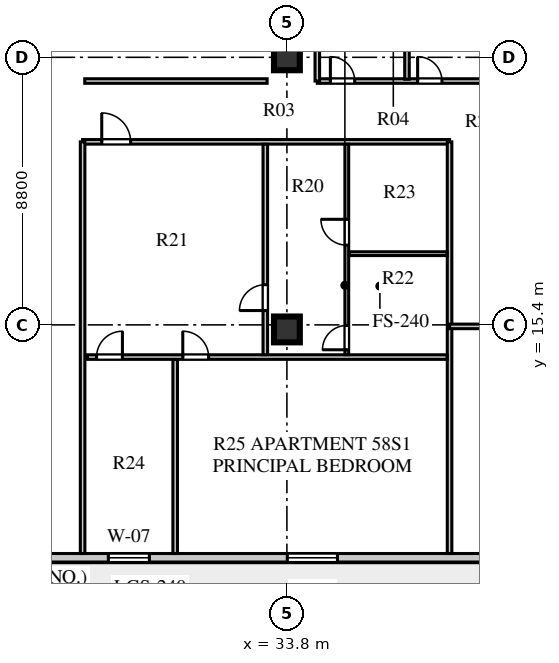
"""IFC4 building model, lengths in metres.
Left out: names, types, materials, properties, quantities, classifications, styles, units other than length and angle.
Written with IfcOpenShell. Run it as: python <this file> out.ifc"""

import sys

from ifc_helpers import new_model, si_unit, direction, frame, frame_2d, origin, origin_2d, place, context, subcontext, project, spatial, rectangle, extrude, element, fill, save


model = new_model("IFC4")
c1 = context("Model", 3, precision=1e-05, world=origin(), true_north=direction((0.0, 1.0)))
c2 = subcontext(c1, "Body", "Model", "MODEL_VIEW")
j1 = project(units=[si_unit("LENGTHUNIT", "METRE"), si_unit("PLANEANGLEUNIT", "RADIAN")], contexts=[c1])
p1 = place(None, origin())
s1 = spatial("IfcSite", under=j1, at=p1, CompositionType="ELEMENT")
p2 = place(p1, origin())
s2 = spatial("IfcBuilding", under=s1, at=p2, CompositionType="ELEMENT")
p3 = place(p2, frame((0.0, 0.0, 237.5)))
s3 = spatial("IfcBuildingStorey", under=s2, at=p3, CompositionType="ELEMENT", Elevation=237.5)
for number, where, z_axis, x_axis in (
    (1, (33.8, 15.25, 0.0), (0.0, 0.0, 1.0), (1.0, 0.0, 0.0)),
    (2, (33.8, 24.2, 0.0), (0.0, 0.0, 1.0), (1.0, 0.0, 0.0)),
):
    element("IfcColumn", number, at=place(p3, frame(where, z_axis=z_axis, x_axis=x_axis)), inside=s3, PredefinedType="COLUMN", context=c2, shape_type="SweptSolid", body=[
        extrude(rectangle(XDim=0.85, YDim=0.85, at=origin_2d()), origin(), (0.0, 0.0, 1.0), 3.66),
    ])
p4 = place(p3, frame((13.05, 7.74, 0.0), z_axis=(0.0, 0.0, 1.0), x_axis=(1.0, 0.0, 0.0)))
e3 = element("IfcWall", 3, at=p4, inside=s3, PredefinedType="STANDARD", context=c2, shape_type="SweptSolid", body=[
    extrude(rectangle(XDim=32.5, YDim=0.28, at=frame_2d((16.25, 0.0))), origin(), (0.0, 0.0, 1.0), 3.66),
])
p5 = place(p4, frame((0.95, 0.0, 0.0)))
e4 = element("IfcOpeningElement", 4, at=p5, cuts=e3, PredefinedType="OPENING", context=c2, shape_type="SweptSolid", body=[
    extrude(rectangle(XDim=1.0, YDim=2.05, at=frame_2d((0.5, 1.025))), frame((0.0, 0.15, 0.0), z_axis=(0.0, -1.0, 0.0), x_axis=(1.0, 0.0, 0.0)), (0.0, 0.0, 1.0), 0.3),
])
p6 = place(p4, frame((5.985, 0.0, 0.8)))
e5 = element("IfcOpeningElement", 5, at=p6, cuts=e3, PredefinedType="OPENING", context=c2, shape_type="SweptSolid", body=[
    extrude(rectangle(XDim=2.1, YDim=1.95, at=frame_2d((1.05, 0.975))), frame((0.0, 0.15, 0.0), z_axis=(0.0, -1.0, 0.0), x_axis=(1.0, 0.0, 0.0)), (0.0, 0.0, 1.0), 0.3),
])
p7 = place(p4, frame((14.877, 0.0, 0.8)))
e6 = element("IfcOpeningElement", 6, at=p7, cuts=e3, PredefinedType="OPENING", context=c2, shape_type="SweptSolid", body=[
    extrude(rectangle(XDim=1.35, YDim=1.9, at=frame_2d((0.675, 0.95))), frame((0.0, 0.15, 0.0), z_axis=(0.0, -1.0, 0.0), x_axis=(1.0, 0.0, 0.0)), (0.0, 0.0, 1.0), 0.3),
])
p8 = place(p4, frame((20.763, 0.0, 0.8)))
e7 = element("IfcOpeningElement", 7, at=p8, cuts=e3, PredefinedType="OPENING", context=c2, shape_type="SweptSolid", body=[
    extrude(rectangle(XDim=1.65, YDim=1.95, at=frame_2d((0.825, 0.975))), frame((0.0, 0.15, 0.0), z_axis=(0.0, -1.0, 0.0), x_axis=(1.0, 0.0, 0.0)), (0.0, 0.0, 1.0), 0.3),
])
p9 = place(p4, frame((28.27, 0.0, 0.8)))
e8 = element("IfcOpeningElement", 8, at=p9, cuts=e3, PredefinedType="OPENING", context=c2, shape_type="SweptSolid", body=[
    extrude(rectangle(XDim=1.95, YDim=2.0, at=frame_2d((0.975, 1.0))), frame((0.0, 0.15, 0.0), z_axis=(0.0, -1.0, 0.0), x_axis=(1.0, 0.0, 0.0)), (0.0, 0.0, 1.0), 0.3),
])
p10 = place(p3, frame((27.08, 21.42, 0.0), z_axis=(0.0, 0.0, 1.0), x_axis=(1.0, 0.0, 0.0)))
e9 = element("IfcWall", 9, at=p10, inside=s3, PredefinedType="PARTITIONING", context=c2, shape_type="SweptSolid", body=[
    extrude(rectangle(XDim=12.07, YDim=0.15, at=frame_2d((6.035, 0.0))), origin(), (0.0, 0.0, 1.0), 3.31),
])
p11 = place(p10, frame((0.63, 0.0, 0.0)))
e10 = element("IfcOpeningElement", 10, at=p11, cuts=e9, PredefinedType="OPENING", context=c2, shape_type="SweptSolid", body=[
    extrude(rectangle(XDim=0.95, YDim=2.1, at=frame_2d((0.475, 1.05))), frame((0.0, 0.085, 0.0), z_axis=(0.0, -1.0, 0.0), x_axis=(1.0, 0.0, 0.0)), (0.0, 0.0, 1.0), 0.17),
])
p12 = place(p3, frame((27.08, 7.88, 0.0), z_axis=(0.0, 0.0, 1.0), x_axis=(0.0, 1.0, 0.0)))
e11 = element("IfcWall", 11, at=p12, inside=s3, PredefinedType="PARTITIONING", context=c2, shape_type="SweptSolid", body=[
    extrude(rectangle(XDim=13.54, YDim=0.15, at=frame_2d((6.77, 0.0))), origin(), (0.0, 0.0, 1.0), 3.66),
])
p13 = place(p3, frame((27.15, 23.42, 0.0), z_axis=(0.0, 0.0, 1.0), x_axis=(1.0, 0.0, 0.0)))
e12 = element("IfcWall", 12, at=p13, inside=s3, PredefinedType="PARTITIONING", context=c2, shape_type="SweptSolid", body=[
    extrude(rectangle(XDim=6.0, YDim=0.15, at=frame_2d((3.0, 0.0))), origin(), (0.0, 0.0, 1.0), 3.66),
])
p14 = place(p3, frame((39.15, 7.88, 0.0), z_axis=(0.0, 0.0, 1.0), x_axis=(0.0, 1.0, 0.0)))
e13 = element("IfcWall", 13, at=p14, inside=s3, PredefinedType="PARTITIONING", context=c2, shape_type="SweptSolid", body=[
    extrude(rectangle(XDim=13.54, YDim=0.15, at=frame_2d((6.77, 0.0))), origin(), (0.0, 0.0, 1.0), 3.66),
])
p15 = place(p3, frame((27.24, 14.341, 0.0), z_axis=(0.0, 0.0, 1.0), x_axis=(1.0, 0.0, 0.0)))
e14 = element("IfcWall", 14, at=p15, inside=s3, PredefinedType="PARTITIONING", context=c2, shape_type="SweptSolid", body=[
    extrude(rectangle(XDim=11.83, YDim=0.15, at=frame_2d((5.915, 0.0))), origin(), (0.0, 0.0, 1.0), 3.66),
])
p16 = place(p15, frame((0.3, 0.0, 0.0)))
e15 = element("IfcOpeningElement", 15, at=p16, cuts=e14, PredefinedType="OPENING", context=c2, shape_type="SweptSolid", body=[
    extrude(rectangle(XDim=0.85, YDim=2.08, at=frame_2d((0.425, 1.04))), frame((0.0, 0.085, 0.0), z_axis=(0.0, -1.0, 0.0), x_axis=(1.0, 0.0, 0.0)), (0.0, 0.0, 1.0), 0.17),
])
p17 = place(p15, frame((3.135, 0.0, 0.0)))
e16 = element("IfcOpeningElement", 16, at=p17, cuts=e14, PredefinedType="OPENING", context=c2, shape_type="SweptSolid", body=[
    extrude(rectangle(XDim=0.85, YDim=2.08, at=frame_2d((0.425, 1.04))), frame((0.0, 0.085, 0.0), z_axis=(0.0, -1.0, 0.0), x_axis=(1.0, 0.0, 0.0)), (0.0, 0.0, 1.0), 0.17),
])
p18 = place(p3, frame((35.77, 14.421, 0.0), z_axis=(0.0, 0.0, 1.0), x_axis=(0.0, 1.0, 0.0)))
e17 = element("IfcWall", 17, at=p18, inside=s3, PredefinedType="PLUMBINGWALL", context=c2, shape_type="SweptSolid", body=[
    extrude(rectangle(XDim=6.919, YDim=0.125, at=frame_2d((3.459, 0.0))), origin(), (0.0, 0.0, 1.0), 3.66),
])
p19 = place(p18, frame((0.16, 0.0, 0.0)))
e18 = element("IfcOpeningElement", 18, at=p19, cuts=e17, PredefinedType="OPENING", context=c2, shape_type="SweptSolid", body=[
    extrude(rectangle(XDim=0.8, YDim=2.05, at=frame_2d((0.4, 1.025))), frame((0.0, 0.073, 0.0), z_axis=(0.0, -1.0, 0.0), x_axis=(1.0, 0.0, 0.0)), (0.0, 0.0, 1.0), 0.145),
])
p20 = place(p18, frame((3.601, 0.0, 0.0)))
e19 = element("IfcOpeningElement", 19, at=p20, cuts=e17, PredefinedType="OPENING", context=c2, shape_type="SweptSolid", body=[
    extrude(rectangle(XDim=0.85, YDim=2.08, at=frame_2d((0.425, 1.04))), frame((0.0, 0.073, 0.0), z_axis=(0.0, -1.0, 0.0), x_axis=(1.0, 0.0, 0.0)), (0.0, 0.0, 1.0), 0.145),
])
p21 = place(p3, frame((35.85, 17.742, 0.0), z_axis=(0.0, 0.0, 1.0), x_axis=(1.0, 0.0, 0.0)))
e20 = element("IfcWall", 20, at=p21, inside=s3, PredefinedType="PLUMBINGWALL", context=c2, shape_type="SweptSolid", body=[
    extrude(rectangle(XDim=3.22, YDim=0.125, at=frame_2d((1.61, 0.0))), origin(), (0.0, 0.0, 1.0), 3.66),
])
p22 = place(p3, frame((33.09, 14.421, 0.0), z_axis=(0.0, 0.0, 1.0), x_axis=(0.0, 1.0, 0.0)))
e21 = element("IfcWall", 21, at=p22, inside=s3, PredefinedType="PARTITIONING", context=c2, shape_type="SweptSolid", body=[
    extrude(rectangle(XDim=6.919, YDim=0.15, at=frame_2d((3.459, 0.0))), origin(), (0.0, 0.0, 1.0), 3.66),
])
p23 = place(p22, frame((1.45, 0.0, 0.0)))
e22 = element("IfcOpeningElement", 22, at=p23, cuts=e21, PredefinedType="OPENING", context=c2, shape_type="SweptSolid", body=[
    extrude(rectangle(XDim=0.85, YDim=2.08, at=frame_2d((0.425, 1.04))), frame((0.0, 0.085, 0.0), z_axis=(0.0, -1.0, 0.0), x_axis=(1.0, 0.0, 0.0)), (0.0, 0.0, 1.0), 0.17),
])
p24 = place(p3, frame((30.125, 7.88, 0.0), z_axis=(0.0, 0.0, 1.0), x_axis=(0.0, 1.0, 0.0)))
e23 = element("IfcWall", 23, at=p24, inside=s3, PredefinedType="PARTITIONING", context=c2, shape_type="SweptSolid", body=[
    extrude(rectangle(XDim=6.381, YDim=0.15, at=frame_2d((3.19, 0.0))), origin(), (0.0, 0.0, 1.0), 3.66),
])
p25 = place(p3, frame((39.15, 15.35, 0.0), z_axis=(0.0, 0.0, 1.0), x_axis=(1.0, 0.0, 0.0)))
e24 = element("IfcWall", 24, at=p25, inside=s3, PredefinedType="PARTITIONING", context=c2, shape_type="SweptSolid", body=[
    extrude(rectangle(XDim=11.37, YDim=0.15, at=frame_2d((5.685, 0.0))), origin(), (0.0, 0.0, 1.0), 3.06),
])
p26 = place(p3, frame((34.8, 23.42, 0.0), z_axis=(0.0, 0.0, 1.0), x_axis=(1.0, 0.0, 0.0)))
e25 = element("IfcWall", 25, at=p26, inside=s3, PredefinedType="PARTITIONING", context=c2, shape_type="SweptSolid", body=[
    extrude(rectangle(XDim=5.9, YDim=0.15, at=frame_2d((2.95, 0.0))), origin(), (0.0, 0.0, 1.0), 3.66),
])
p27 = place(p26, frame((0.43, 0.0, 0.0)))
e26 = element("IfcOpeningElement", 26, at=p27, cuts=e25, PredefinedType="OPENING", context=c2, shape_type="SweptSolid", body=[
    extrude(rectangle(XDim=0.8, YDim=2.05, at=frame_2d((0.4, 1.025))), frame((0.0, 0.085, 0.0), z_axis=(0.0, -1.0, 0.0), x_axis=(1.0, 0.0, 0.0)), (0.0, 0.0, 1.0), 0.17),
])
p28 = place(p26, frame((3.3, 0.0, 0.0)))
e27 = element("IfcOpeningElement", 27, at=p28, cuts=e25, PredefinedType="OPENING", context=c2, shape_type="SweptSolid", body=[
    extrude(rectangle(XDim=0.8, YDim=2.05, at=frame_2d((0.4, 1.025))), frame((0.0, 0.085, 0.0), z_axis=(0.0, -1.0, 0.0), x_axis=(1.0, 0.0, 0.0)), (0.0, 0.0, 1.0), 0.17),
])
p29 = place(p3, frame((34.8, 23.42, 0.0), z_axis=(0.0, 0.0, 1.0), x_axis=(0.0, 1.0, 0.0)))
e28 = element("IfcWall", 28, at=p29, inside=s3, PredefinedType="PARTITIONING", context=c2, shape_type="SweptSolid", body=[
    extrude(rectangle(XDim=3.78, YDim=0.15, at=frame_2d((1.89, 0.0))), origin(), (0.0, 0.0, 1.0), 3.66),
])
p30 = place(p3, frame((37.75, 23.48, 0.0), z_axis=(0.0, 0.0, 1.0), x_axis=(0.0, 1.0, 0.0)))
e29 = element("IfcWall", 29, at=p30, inside=s3, PredefinedType="PARTITIONING", context=c2, shape_type="SweptSolid", body=[
    extrude(rectangle(XDim=3.66, YDim=0.15, at=frame_2d((1.83, 0.0))), origin(), (0.0, 0.0, 1.0), 3.66),
])
p31 = place(p7, origin())
e30 = element("IfcWindow", 30, at=p31, inside=s3, PartitioningType="SINGLE_PANEL", PredefinedType="WINDOW", context=c2, shape_type="SweptSolid", body=[
    extrude(rectangle(XDim=1.35, YDim=1.9, at=frame_2d((0.675, 0.95))), frame((0.0, 0.03, 0.0), z_axis=(0.0, -1.0, 0.0), x_axis=(1.0, 0.0, 0.0)), (0.0, 0.0, 1.0), 0.06),
])
fill(e6, e30)
p32 = place(p8, origin())
e31 = element("IfcWindow", 31, at=p32, inside=s3, PartitioningType="SINGLE_PANEL", PredefinedType="WINDOW", context=c2, shape_type="SweptSolid", body=[
    extrude(rectangle(XDim=1.65, YDim=1.95, at=frame_2d((0.825, 0.975))), frame((0.0, 0.03, 0.0), z_axis=(0.0, -1.0, 0.0), x_axis=(1.0, 0.0, 0.0)), (0.0, 0.0, 1.0), 0.06),
])
fill(e7, e31)
p33 = place(p23, origin())
e32 = element("IfcDoor", 32, at=p33, inside=s3, OperationType="SINGLE_SWING_LEFT", PredefinedType="DOOR", context=c2, shape_type="SweptSolid", body=[
    extrude(rectangle(XDim=0.85, YDim=2.08, at=frame_2d((0.425, 1.04))), frame((0.0, 0.025, 0.0), z_axis=(0.0, -1.0, 0.0), x_axis=(1.0, 0.0, 0.0)), (0.0, 0.0, 1.0), 0.05),
])
fill(e22, e32)
p34 = place(p19, origin())
e33 = element("IfcDoor", 33, at=p34, inside=s3, OperationType="SINGLE_SWING_LEFT", PredefinedType="DOOR", context=c2, shape_type="SweptSolid", body=[
    extrude(rectangle(XDim=0.8, YDim=2.05, at=frame_2d((0.4, 1.025))), frame((0.0, 0.025, 0.0), z_axis=(0.0, -1.0, 0.0), x_axis=(1.0, 0.0, 0.0)), (0.0, 0.0, 1.0), 0.05),
])
fill(e18, e33)
p35 = place(p20, origin())
e34 = element("IfcDoor", 34, at=p35, inside=s3, OperationType="SINGLE_SWING_RIGHT", PredefinedType="DOOR", context=c2, shape_type="SweptSolid", body=[
    extrude(rectangle(XDim=0.85, YDim=2.08, at=frame_2d((0.425, 1.04))), frame((0.0, 0.025, 0.0), z_axis=(0.0, -1.0, 0.0), x_axis=(1.0, 0.0, 0.0)), (0.0, 0.0, 1.0), 0.05),
])
fill(e19, e34)
p36 = place(p16, frame((0.85, 0.0, 0.0), z_axis=(0.0, 0.0, 1.0), x_axis=(-1.0, 0.0, 0.0)))
e35 = element("IfcDoor", 35, at=p36, inside=s3, OperationType="SINGLE_SWING_LEFT", PredefinedType="DOOR", context=c2, shape_type="SweptSolid", body=[
    extrude(rectangle(XDim=0.85, YDim=2.08, at=frame_2d((0.425, 1.04))), frame((0.0, 0.025, 0.0), z_axis=(0.0, -1.0, 0.0), x_axis=(1.0, 0.0, 0.0)), (0.0, 0.0, 1.0), 0.05),
])
fill(e15, e35)
p37 = place(p17, frame((0.85, 0.0, 0.0), z_axis=(0.0, 0.0, 1.0), x_axis=(-1.0, 0.0, 0.0)))
e36 = element("IfcDoor", 36, at=p37, inside=s3, OperationType="SINGLE_SWING_RIGHT", PredefinedType="DOOR", context=c2, shape_type="SweptSolid", body=[
    extrude(rectangle(XDim=0.85, YDim=2.08, at=frame_2d((0.425, 1.04))), frame((0.0, 0.025, 0.0), z_axis=(0.0, -1.0, 0.0), x_axis=(1.0, 0.0, 0.0)), (0.0, 0.0, 1.0), 0.05),
])
fill(e16, e36)
p38 = place(p11, frame((0.95, 0.0, 0.0), z_axis=(0.0, 0.0, 1.0), x_axis=(-1.0, 0.0, 0.0)))
e37 = element("IfcDoor", 37, at=p38, inside=s3, OperationType="SINGLE_SWING_RIGHT", PredefinedType="DOOR", context=c2, shape_type="SweptSolid", body=[
    extrude(rectangle(XDim=0.95, YDim=2.1, at=frame_2d((0.475, 1.05))), frame((0.0, 0.025, 0.0), z_axis=(0.0, -1.0, 0.0), x_axis=(1.0, 0.0, 0.0)), (0.0, 0.0, 1.0), 0.05),
])
fill(e10, e37)
p39 = place(p27, origin())
e38 = element("IfcDoor", 38, at=p39, inside=s3, OperationType="SINGLE_SWING_LEFT", PredefinedType="DOOR", context=c2, shape_type="SweptSolid", body=[
    extrude(rectangle(XDim=0.8, YDim=2.05, at=frame_2d((0.4, 1.025))), frame((0.0, 0.025, 0.0), z_axis=(0.0, -1.0, 0.0), x_axis=(1.0, 0.0, 0.0)), (0.0, 0.0, 1.0), 0.05),
])
fill(e26, e38)
p40 = place(p28, origin())
e39 = element("IfcDoor", 39, at=p40, inside=s3, OperationType="SINGLE_SWING_LEFT", PredefinedType="DOOR", context=c2, shape_type="SweptSolid", body=[
    extrude(rectangle(XDim=0.8, YDim=2.05, at=frame_2d((0.4, 1.025))), frame((0.0, 0.025, 0.0), z_axis=(0.0, -1.0, 0.0), x_axis=(1.0, 0.0, 0.0)), (0.0, 0.0, 1.0), 0.05),
])
fill(e27, e39)
save(model, sys.argv[1])
